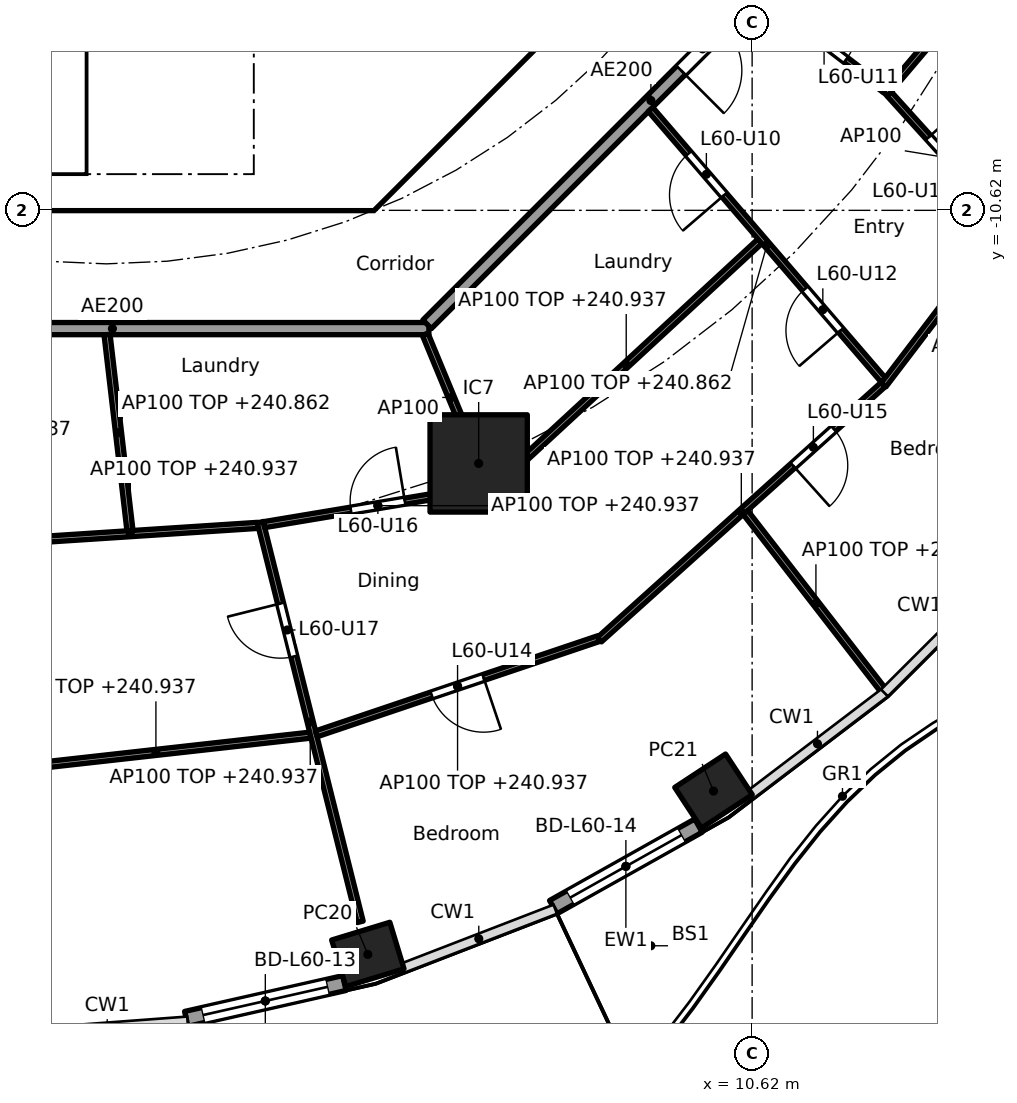
"""IFC4 building model, lengths in metres.
Left out: names, types, materials, properties, quantities, classifications, styles, units other than length and angle.
Written with IfcOpenShell. Run it as: python <this file> out.ifc"""

import sys

from ifc_helpers import new_model, si_unit, direction, frame, frame_2d, origin, origin_2d, place, context, subcontext, project, spatial, polyline, rectangle, hollow_rectangle, outline, extrude, element, fill, save


model = new_model("IFC4")
c1 = context("Model", 3, precision=1e-05, world=origin(), true_north=direction((0.0, 1.0)))
c2 = subcontext(c1, "Body", "Model", "MODEL_VIEW")
j1 = project(units=[si_unit("LENGTHUNIT", "METRE"), si_unit("PLANEANGLEUNIT", "RADIAN")], contexts=[c1])
p1 = place(None, origin())
s1 = spatial("IfcSite", under=j1, at=p1, CompositionType="ELEMENT")
p2 = place(p1, origin())
s2 = spatial("IfcBuilding", under=s1, at=p2, CompositionType="ELEMENT")
p3 = place(p2, frame((0.0, 0.0, 238.1)))
s3 = spatial("IfcBuildingStorey", under=s2, at=p3, CompositionType="ELEMENT", Elevation=238.1)
for number, where, z_axis, x_axis in (
    (1, (4.3, -22.856, 0.0), (0.0, 0.0, 1.0), (0.957, 0.292, 0.0)),
    (2, (9.985, -20.17, 0.0), (0.0, 0.0, 1.0), (0.836, 0.549, 0.0)),
):
    element("IfcColumn", number, at=place(p3, frame(where, z_axis=z_axis, x_axis=x_axis)), inside=s3, PredefinedType="COLUMN", context=c2, shape_type="SweptSolid", body=[
        extrude(hollow_rectangle(XDim=1.0, YDim=0.8, WallThickness=0.032, at=origin_2d()), origin(), (0.0, 0.0, 1.0), 3.7),
    ])
p4 = place(p3, frame((6.123, -14.782, 0.0), z_axis=(0.0, 0.0, 1.0), x_axis=(1.0, 0.0, 0.0)))
e3 = element("IfcColumn", 3, at=p4, inside=s3, PredefinedType="COLUMN", context=c2, shape_type="SweptSolid", body=[
    extrude(rectangle(XDim=1.6, YDim=1.6, at=origin_2d()), origin(), (0.0, 0.0, 1.0), 3.7),
])
p5 = place(p3, frame((3.915, -23.327, 0.0), z_axis=(0.0, 0.0, 1.0), x_axis=(-0.975324089124, -0.220777990694, 0.0)))
e4 = element("IfcWall", 4, at=p5, inside=s3, PredefinedType="SOLIDWALL", context=c2, shape_type="SweptSolid", body=[
    extrude(rectangle(XDim=2.666, YDim=0.25, at=frame_2d((1.333, 0.0))), origin(), (0.0, 0.0, 1.0), 3.44),
])
p6 = place(p5, frame((0.283, 0.0, 0.0)))
e5 = element("IfcOpeningElement", 5, at=p6, cuts=e4, PredefinedType="OPENING", context=c2, shape_type="SweptSolid", body=[
    extrude(rectangle(XDim=2.1, YDim=2.4, at=frame_2d((1.05, 1.2))), frame((0.0, 0.135, 0.0), z_axis=(0.0, -1.0, 0.0), x_axis=(1.0, 0.0, 0.0)), (0.0, 0.0, 1.0), 0.27),
])
p7 = place(p3, frame((9.738, -20.739, 0.0), z_axis=(0.0, 0.0, 1.0), x_axis=(-0.872079929129, -0.489363461254, 0.0)))
e6 = element("IfcWall", 6, at=p7, inside=s3, PredefinedType="SOLIDWALL", context=c2, shape_type="SweptSolid", body=[
    extrude(rectangle(XDim=2.738, YDim=0.25, at=frame_2d((1.369, 0.0))), origin(), (0.0, 0.0, 1.0), 3.44),
])
p8 = place(p7, frame((0.319, 0.0, 0.0)))
e7 = element("IfcOpeningElement", 7, at=p8, cuts=e6, PredefinedType="OPENING", context=c2, shape_type="SweptSolid", body=[
    extrude(rectangle(XDim=2.1, YDim=2.4, at=frame_2d((1.05, 1.2))), frame((0.0, 0.135, 0.0), z_axis=(0.0, -1.0, 0.0), x_axis=(1.0, 0.0, 0.0)), (0.0, 0.0, 1.0), 0.27),
])
p9 = place(p3, frame((4.613, -9.988, 0.0), z_axis=(0.0, 0.0, 1.0), x_axis=(0.707106781187, 0.707106781187, 0.0)))
e8 = element("IfcWall", 8, at=p9, inside=s3, PredefinedType="SHEAR", context=c2, shape_type="SweptSolid", body=[
    extrude(rectangle(XDim=7.602, YDim=0.6, at=frame_2d((3.801, 0.0))), origin(), (0.0, 0.0, 1.0), 3.44),
])
p10 = place(p9, frame((3.201, 0.0, 0.0)))
e9 = element("IfcOpeningElement", 9, at=p10, cuts=e8, PredefinedType="OPENING", context=c2, shape_type="SweptSolid", body=[
    extrude(rectangle(XDim=1.2, YDim=2.1, at=frame_2d((0.6, 1.05))), frame((0.0, 0.31, 0.0), z_axis=(0.0, -1.0, 0.0), x_axis=(1.0, 0.0, 0.0)), (0.0, 0.0, 1.0), 0.62),
])
p11 = place(p3, frame((4.0, -10.025, 0.0), z_axis=(0.0, 0.0, 1.0), x_axis=(0.0, 1.0, 0.0)))
e10 = element("IfcWall", 10, at=p11, inside=s3, PredefinedType="SOLIDWALL", context=c2, shape_type="SweptSolid", body=[
    extrude(rectangle(XDim=3.0, YDim=0.2, at=frame_2d((1.5, 0.0))), origin(), (0.0, 0.0, 1.0), 3.44),
])
p12 = place(p11, frame((0.975, 0.0, 0.0)))
e11 = element("IfcOpeningElement", 11, at=p12, cuts=e10, PredefinedType="OPENING", context=c2, shape_type="SweptSolid", body=[
    extrude(rectangle(XDim=1.1, YDim=2.1, at=frame_2d((0.55, 1.05))), frame((0.0, 0.11, 0.0), z_axis=(0.0, -1.0, 0.0), x_axis=(1.0, 0.0, 0.0)), (0.0, 0.0, 1.0), 0.22),
])
p13 = place(p3, origin())
e12 = element("IfcWall", 12, at=p13, inside=s3, PredefinedType="SHEAR", context=c2, shape_type="SweptSolid", body=[
    extrude(outline(polyline([(-4.152, -10.025), (4.152, -10.025), (4.401, -9.776), (4.825, -10.2), (4.401, -10.625), (-4.401, -10.625), (-4.825, -10.2), (-4.401, -9.776), (-4.152, -10.025)])), origin(), (0.0, 0.0, 1.0), 3.44),
])
p14 = place(p3, frame((-5.104, -12.565, 0.0), z_axis=(0.0, 0.0, 1.0), x_axis=(1.0, 0.0, 0.0)))
e13 = element("IfcWall", 13, at=p14, inside=s3, PredefinedType="PARTITIONING", context=c2, shape_type="SweptSolid", body=[
    extrude(rectangle(XDim=10.409, YDim=0.2, at=frame_2d((5.205, 0.0))), origin(), (0.0, 0.0, 1.0), 3.44),
])
p15 = place(p3, frame((5.275, -12.494, 0.0), z_axis=(0.0, 0.0, 1.0), x_axis=(0.707106781187, 0.707106781187, 0.0)))
e14 = element("IfcWall", 14, at=p15, inside=s3, PredefinedType="PARTITIONING", context=c2, shape_type="SweptSolid", body=[
    extrude(rectangle(XDim=10.409, YDim=0.2, at=frame_2d((5.205, 0.0))), origin(), (0.0, 0.0, 1.0), 3.44),
])
p16 = place(p15, frame((5.906, 0.0, 0.0)))
e15 = element("IfcOpeningElement", 15, at=p16, cuts=e14, PredefinedType="OPENING", context=c2, shape_type="SweptSolid", body=[
    extrude(rectangle(XDim=1.0, YDim=2.1, at=frame_2d((0.5, 1.05))), frame((0.0, 0.11, 0.0), z_axis=(0.0, -1.0, 0.0), x_axis=(1.0, 0.0, 0.0)), (0.0, 0.0, 1.0), 0.22),
])
p17 = place(p3, frame((-1.705, -16.074, 0.0), z_axis=(0.0, 0.0, 1.0), x_axis=(0.997885428049, 0.064997480629, 0.0)))
e16 = element("IfcWall", 16, at=p17, inside=s3, PredefinedType="PARTITIONING", context=c2, shape_type="SweptSolid", body=[
    extrude(rectangle(XDim=4.207, YDim=0.1, at=frame_2d((2.104, 0.0))), origin(), (0.0, 0.0, 1.0), 2.837),
])
p18 = place(p3, frame((-1.726, -19.818, 0.0), z_axis=(0.0, 0.0, 1.0), x_axis=(0.99381893047, 0.111013212902, 0.0)))
e17 = element("IfcWall", 17, at=p18, inside=s3, PredefinedType="PARTITIONING", context=c2, shape_type="SweptSolid", body=[
    extrude(rectangle(XDim=5.113, YDim=0.1, at=frame_2d((2.557, 0.0))), origin(), (0.0, 0.0, 1.0), 2.837),
])
p19 = place(p3, frame((0.012, -12.664, 0.0), z_axis=(0.0, 0.0, 1.0), x_axis=(0.116151589236, -0.993231497848, 0.0)))
e18 = element("IfcWall", 18, at=p19, inside=s3, PredefinedType="PARTITIONING", context=c2, shape_type="SweptSolid", body=[
    extrude(rectangle(XDim=3.245, YDim=0.1, at=frame_2d((1.623, 0.0))), origin(), (0.0, 0.0, 1.0), 2.762),
])
p20 = place(p3, frame((2.531, -15.749, 0.0), z_axis=(0.0, 0.0, 1.0), x_axis=(0.242645858264, -0.970114935184, 0.0)))
e19 = element("IfcWall", 19, at=p20, inside=s3, PredefinedType="PARTITIONING", context=c2, shape_type="SweptSolid", body=[
    extrude(rectangle(XDim=6.774, YDim=0.1, at=frame_2d((3.387, 0.0))), origin(), (0.0, 0.0, 1.0), 2.837),
])
p21 = place(p20, frame((1.377, 0.0, 0.0)))
e20 = element("IfcOpeningElement", 20, at=p21, cuts=e19, PredefinedType="OPENING", context=c2, shape_type="SweptSolid", body=[
    extrude(rectangle(XDim=0.9, YDim=2.1, at=frame_2d((0.45, 1.05))), frame((0.0, 0.06, 0.0), z_axis=(0.0, -1.0, 0.0), x_axis=(1.0, 0.0, 0.0)), (0.0, 0.0, 1.0), 0.12),
])
p22 = place(p3, frame((2.593, -15.789, 0.0), z_axis=(0.0, 0.0, 1.0), x_axis=(0.986381756816, 0.164471972749, 0.0)))
e21 = element("IfcWall", 21, at=p22, inside=s3, PredefinedType="PARTITIONING", context=c2, shape_type="SweptSolid", body=[
    extrude(rectangle(XDim=3.797, YDim=0.1, at=frame_2d((1.898, 0.0))), origin(), (0.0, 0.0, 1.0), 2.837),
])
p23 = place(p22, frame((1.448, 0.0, 0.0)))
e22 = element("IfcOpeningElement", 22, at=p23, cuts=e21, PredefinedType="OPENING", context=c2, shape_type="SweptSolid", body=[
    extrude(rectangle(XDim=0.9, YDim=2.1, at=frame_2d((0.45, 1.05))), frame((0.0, 0.06, 0.0), z_axis=(0.0, -1.0, 0.0), x_axis=(1.0, 0.0, 0.0)), (0.0, 0.0, 1.0), 0.12),
])
p24 = place(p3, frame((3.453, -19.229, 0.0), z_axis=(0.0, 0.0, 1.0), x_axis=(0.947572025416, 0.319542261133, 0.0)))
e23 = element("IfcWall", 23, at=p24, inside=s3, PredefinedType="PARTITIONING", context=c2, shape_type="SweptSolid", body=[
    extrude(rectangle(XDim=4.903, YDim=0.1, at=frame_2d((2.451, 0.0))), origin(), (0.0, 0.0, 1.0), 2.837),
])
p25 = place(p24, frame((2.001, 0.0, 0.0)))
e24 = element("IfcOpeningElement", 24, at=p25, cuts=e23, PredefinedType="OPENING", context=c2, shape_type="SweptSolid", body=[
    extrude(rectangle(XDim=0.9, YDim=2.1, at=frame_2d((0.45, 1.05))), frame((0.0, 0.06, 0.0), z_axis=(0.0, -1.0, 0.0), x_axis=(1.0, 0.0, 0.0)), (0.0, 0.0, 1.0), 0.12),
])
p26 = place(p3, frame((5.243, -12.657, 0.0), z_axis=(0.0, 0.0, 1.0), x_axis=(0.382719158442, -0.923864733477, 0.0)))
e25 = element("IfcWall", 25, at=p26, inside=s3, PredefinedType="PARTITIONING", context=c2, shape_type="SweptSolid", body=[
    extrude(rectangle(XDim=2.25, YDim=0.1, at=frame_2d((1.125, 0.0))), origin(), (0.0, 0.0, 1.0), 3.44),
])
p27 = place(p3, frame((6.351, -15.19, 0.0), z_axis=(0.0, 0.0, 1.0), x_axis=(0.73462674599, 0.678471476243, 0.0)))
e26 = element("IfcWall", 26, at=p27, inside=s3, PredefinedType="PARTITIONING", context=c2, shape_type="SweptSolid", body=[
    extrude(rectangle(XDim=5.987, YDim=0.1, at=frame_2d((2.993, 0.0))), origin(), (0.0, 0.0, 1.0), 2.837),
])
p28 = place(p3, frame((8.109, -17.679, 0.0), z_axis=(0.0, 0.0, 1.0), x_axis=(0.743675165651, 0.668541134108, 0.0)))
e27 = element("IfcWall", 27, at=p28, inside=s3, PredefinedType="PARTITIONING", context=c2, shape_type="SweptSolid", body=[
    extrude(rectangle(XDim=6.275, YDim=0.1, at=frame_2d((3.137, 0.0))), origin(), (0.0, 0.0, 1.0), 2.837),
])
p29 = place(p28, frame((4.281, 0.0, 0.0)))
e28 = element("IfcOpeningElement", 28, at=p29, cuts=e27, PredefinedType="OPENING", context=c2, shape_type="SweptSolid", body=[
    extrude(rectangle(XDim=0.9, YDim=2.1, at=frame_2d((0.45, 1.05))), frame((0.0, 0.06, 0.0), z_axis=(0.0, -1.0, 0.0), x_axis=(1.0, 0.0, 0.0)), (0.0, 0.0, 1.0), 0.12),
])
p30 = place(p3, frame((10.51, -15.588, 0.0), z_axis=(0.0, 0.0, 1.0), x_axis=(0.612443725286, -0.79051418922, 0.0)))
e29 = element("IfcWall", 29, at=p30, inside=s3, PredefinedType="PARTITIONING", context=c2, shape_type="SweptSolid", body=[
    extrude(rectangle(XDim=3.785, YDim=0.1, at=frame_2d((1.893, 0.0))), origin(), (0.0, 0.0, 1.0), 2.983),
])
p31 = place(p3, frame((8.95, -8.96, 0.0), z_axis=(0.0, 0.0, 1.0), x_axis=(0.652098047064, -0.758134643065, 0.0)))
e30 = element("IfcWall", 30, at=p31, inside=s3, PredefinedType="PARTITIONING", context=c2, shape_type="SweptSolid", body=[
    extrude(rectangle(XDim=5.874, YDim=0.1, at=frame_2d((2.937, 0.0))), origin(), (0.0, 0.0, 1.0), 2.762),
])
p32 = place(p31, frame((0.957, 0.0, 0.0)))
e31 = element("IfcOpeningElement", 31, at=p32, cuts=e30, PredefinedType="OPENING", context=c2, shape_type="SweptSolid", body=[
    extrude(rectangle(XDim=0.9, YDim=2.1, at=frame_2d((0.45, 1.05))), frame((0.0, 0.06, 0.0), z_axis=(0.0, -1.0, 0.0), x_axis=(1.0, 0.0, 0.0)), (0.0, 0.0, 1.0), 0.12),
])
p33 = place(p31, frame((3.894, 0.0, 0.0)))
e32 = element("IfcOpeningElement", 32, at=p33, cuts=e30, PredefinedType="OPENING", context=c2, shape_type="SweptSolid", body=[
    extrude(rectangle(XDim=0.9, YDim=2.1, at=frame_2d((0.45, 1.05))), frame((0.0, 0.06, 0.0), z_axis=(0.0, -1.0, 0.0), x_axis=(1.0, 0.0, 0.0)), (0.0, 0.0, 1.0), 0.12),
])
p34 = place(p3, frame((12.782, -13.491, 0.0), z_axis=(0.0, 0.0, 1.0), x_axis=(0.606141365852, 0.79535692906, 0.0)))
e33 = element("IfcWall", 33, at=p34, inside=s3, PredefinedType="PARTITIONING", context=c2, shape_type="SweptSolid", body=[
    extrude(rectangle(XDim=6.52, YDim=0.1, at=frame_2d((3.26, 0.0))), origin(), (0.0, 0.0, 1.0), 2.837),
])
p35 = place(p3, frame((10.804, -7.105, 0.0), z_axis=(0.0, 0.0, 1.0), x_axis=(0.793311502848, -0.608815948747, 0.0)))
e34 = element("IfcWall", 34, at=p35, inside=s3, PredefinedType="PARTITIONING", context=c2, shape_type="SweptSolid", body=[
    extrude(rectangle(XDim=2.52, YDim=0.1, at=frame_2d((1.26, 0.0))), origin(), (0.0, 0.0, 1.0), 2.762),
])
p36 = place(p35, frame((0.81, 0.0, 0.0)))
e35 = element("IfcOpeningElement", 35, at=p36, cuts=e34, PredefinedType="OPENING", context=c2, shape_type="SweptSolid", body=[
    extrude(rectangle(XDim=0.9, YDim=2.1, at=frame_2d((0.45, 1.05))), frame((0.0, 0.06, 0.0), z_axis=(0.0, -1.0, 0.0), x_axis=(1.0, 0.0, 0.0)), (0.0, 0.0, 1.0), 0.12),
])
p37 = place(p3, frame((12.876, -8.707, 0.0), z_axis=(0.0, 0.0, 1.0), x_axis=(0.670768418052, -0.741666858733, 0.0)))
e36 = element("IfcWall", 36, at=p37, inside=s3, PredefinedType="PARTITIONING", context=c2, shape_type="SweptSolid", body=[
    extrude(rectangle(XDim=2.824, YDim=0.1, at=frame_2d((1.412, 0.0))), origin(), (0.0, 0.0, 1.0), 3.44),
])
p38 = place(p37, frame((0.962, 0.0, 0.0)))
e37 = element("IfcOpeningElement", 37, at=p38, cuts=e36, PredefinedType="OPENING", context=c2, shape_type="SweptSolid", body=[
    extrude(rectangle(XDim=0.9, YDim=2.1, at=frame_2d((0.45, 1.05))), frame((0.0, 0.06, 0.0), z_axis=(0.0, -1.0, 0.0), x_axis=(1.0, 0.0, 0.0)), (0.0, 0.0, 1.0), 0.12),
])
p39 = place(p3, frame((12.81, -8.708, 0.0), z_axis=(0.0, 0.0, 1.0), x_axis=(0.646973324627, 0.762512634138, 0.0)))
e38 = element("IfcWall", 38, at=p39, inside=s3, PredefinedType="PARTITIONING", context=c2, shape_type="SweptSolid", body=[
    extrude(rectangle(XDim=3.129, YDim=0.1, at=frame_2d((1.565, 0.0))), origin(), (0.0, 0.0, 1.0), 2.837),
])
p40 = place(p6, origin())
e39 = element("IfcDoor", 39, at=p40, inside=s3, OperationType="SLIDING_TO_LEFT", PredefinedType="DOOR", context=c2, shape_type="SweptSolid", body=[
    extrude(rectangle(XDim=2.1, YDim=2.4, at=frame_2d((1.05, 1.2))), frame((0.0, 0.025, 0.0), z_axis=(0.0, -1.0, 0.0), x_axis=(1.0, 0.0, 0.0)), (0.0, 0.0, 1.0), 0.05),
])
fill(e5, e39)
p41 = place(p8, origin())
e40 = element("IfcDoor", 40, at=p41, inside=s3, OperationType="SLIDING_TO_LEFT", PredefinedType="DOOR", context=c2, shape_type="SweptSolid", body=[
    extrude(rectangle(XDim=2.1, YDim=2.4, at=frame_2d((1.05, 1.2))), frame((0.0, 0.025, 0.0), z_axis=(0.0, -1.0, 0.0), x_axis=(1.0, 0.0, 0.0)), (0.0, 0.0, 1.0), 0.05),
])
fill(e7, e40)
p42 = place(p12, origin())
e41 = element("IfcDoor", 41, at=p42, inside=s3, OperationType="SINGLE_SWING_RIGHT", PredefinedType="DOOR", context=c2, shape_type="SweptSolid", body=[
    extrude(rectangle(XDim=1.1, YDim=2.1, at=frame_2d((0.55, 1.05))), frame((0.0, 0.025, 0.0), z_axis=(0.0, -1.0, 0.0), x_axis=(1.0, 0.0, 0.0)), (0.0, 0.0, 1.0), 0.05),
])
fill(e11, e41)
p43 = place(p16, frame((1.0, 0.0, 0.0), x_axis=(-1.0, 0.0, 0.0)))
e42 = element("IfcDoor", 42, at=p43, inside=s3, OperationType="SINGLE_SWING_RIGHT", PredefinedType="DOOR", context=c2, shape_type="SweptSolid", body=[
    extrude(rectangle(XDim=1.0, YDim=2.1, at=frame_2d((0.5, 1.05))), frame((0.0, 0.025, 0.0), z_axis=(0.0, -1.0, 0.0), x_axis=(1.0, 0.0, 0.0)), (0.0, 0.0, 1.0), 0.05),
])
fill(e15, e42)
p44 = place(p32, frame((0.9, 0.0, 0.0), x_axis=(-1.0, 0.0, 0.0)))
e43 = element("IfcDoor", 43, at=p44, inside=s3, OperationType="SINGLE_SWING_LEFT", PredefinedType="DOOR", context=c2, shape_type="SweptSolid", body=[
    extrude(rectangle(XDim=0.9, YDim=2.1, at=frame_2d((0.45, 1.05))), frame((0.0, 0.025, 0.0), z_axis=(0.0, -1.0, 0.0), x_axis=(1.0, 0.0, 0.0)), (0.0, 0.0, 1.0), 0.05),
])
fill(e31, e43)
p45 = place(p36, origin())
e44 = element("IfcDoor", 44, at=p45, inside=s3, OperationType="SINGLE_SWING_LEFT", PredefinedType="DOOR", context=c2, shape_type="SweptSolid", body=[
    extrude(rectangle(XDim=0.9, YDim=2.1, at=frame_2d((0.45, 1.05))), frame((0.0, 0.025, 0.0), z_axis=(0.0, -1.0, 0.0), x_axis=(1.0, 0.0, 0.0)), (0.0, 0.0, 1.0), 0.05),
])
fill(e35, e44)
p46 = place(p33, frame((0.9, 0.0, 0.0), x_axis=(-1.0, 0.0, 0.0)))
e45 = element("IfcDoor", 45, at=p46, inside=s3, OperationType="SINGLE_SWING_LEFT", PredefinedType="DOOR", context=c2, shape_type="SweptSolid", body=[
    extrude(rectangle(XDim=0.9, YDim=2.1, at=frame_2d((0.45, 1.05))), frame((0.0, 0.025, 0.0), z_axis=(0.0, -1.0, 0.0), x_axis=(1.0, 0.0, 0.0)), (0.0, 0.0, 1.0), 0.05),
])
fill(e32, e45)
p47 = place(p38, origin())
e46 = element("IfcDoor", 46, at=p47, inside=s3, OperationType="SINGLE_SWING_LEFT", PredefinedType="DOOR", context=c2, shape_type="SweptSolid", body=[
    extrude(rectangle(XDim=0.9, YDim=2.1, at=frame_2d((0.45, 1.05))), frame((0.0, 0.025, 0.0), z_axis=(0.0, -1.0, 0.0), x_axis=(1.0, 0.0, 0.0)), (0.0, 0.0, 1.0), 0.05),
])
fill(e37, e46)
p48 = place(p25, frame((0.9, 0.0, 0.0), x_axis=(-1.0, 0.0, 0.0)))
e47 = element("IfcDoor", 47, at=p48, inside=s3, OperationType="SINGLE_SWING_LEFT", PredefinedType="DOOR", context=c2, shape_type="SweptSolid", body=[
    extrude(rectangle(XDim=0.9, YDim=2.1, at=frame_2d((0.45, 1.05))), frame((0.0, 0.025, 0.0), z_axis=(0.0, -1.0, 0.0), x_axis=(1.0, 0.0, 0.0)), (0.0, 0.0, 1.0), 0.05),
])
fill(e24, e47)
p49 = place(p29, frame((0.9, 0.0, 0.0), x_axis=(-1.0, 0.0, 0.0)))
e48 = element("IfcDoor", 48, at=p49, inside=s3, OperationType="SINGLE_SWING_RIGHT", PredefinedType="DOOR", context=c2, shape_type="SweptSolid", body=[
    extrude(rectangle(XDim=0.9, YDim=2.1, at=frame_2d((0.45, 1.05))), frame((0.0, 0.025, 0.0), z_axis=(0.0, -1.0, 0.0), x_axis=(1.0, 0.0, 0.0)), (0.0, 0.0, 1.0), 0.05),
])
fill(e28, e48)
p50 = place(p23, origin())
e49 = element("IfcDoor", 49, at=p50, inside=s3, OperationType="SINGLE_SWING_RIGHT", PredefinedType="DOOR", context=c2, shape_type="SweptSolid", body=[
    extrude(rectangle(XDim=0.9, YDim=2.1, at=frame_2d((0.45, 1.05))), frame((0.0, 0.025, 0.0), z_axis=(0.0, -1.0, 0.0), x_axis=(1.0, 0.0, 0.0)), (0.0, 0.0, 1.0), 0.05),
])
fill(e22, e49)
p51 = place(p21, frame((0.9, 0.0, 0.0), x_axis=(-1.0, 0.0, 0.0)))
e50 = element("IfcDoor", 50, at=p51, inside=s3, OperationType="SINGLE_SWING_RIGHT", PredefinedType="DOOR", context=c2, shape_type="SweptSolid", body=[
    extrude(rectangle(XDim=0.9, YDim=2.1, at=frame_2d((0.45, 1.05))), frame((0.0, 0.025, 0.0), z_axis=(0.0, -1.0, 0.0), x_axis=(1.0, 0.0, 0.0)), (0.0, 0.0, 1.0), 0.05),
])
fill(e20, e50)
save(model, sys.argv[1])
